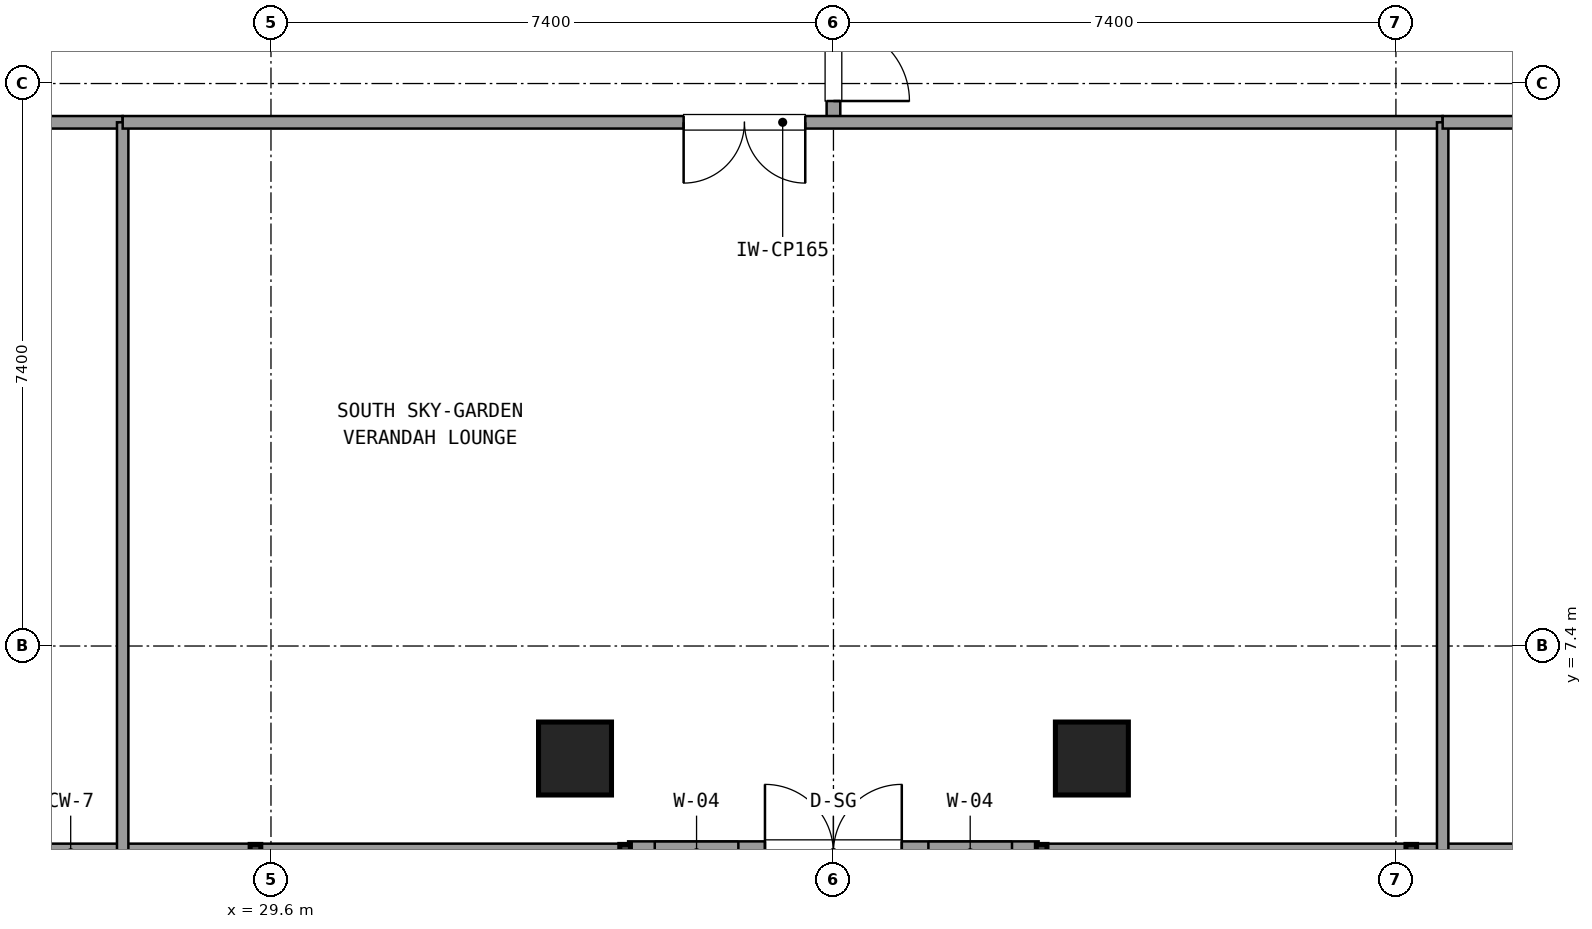
"""IFC4 building model, lengths in metres.
Left out: names, types, materials, properties, quantities, classifications, styles, units other than length and angle.
Written with IfcOpenShell. Run it as: python <this file> out.ifc"""

import sys

from ifc_helpers import new_model, si_unit, direction, frame, frame_2d, origin, origin_2d, place, context, subcontext, project, spatial, rectangle, extrude, element, fill, save


model = new_model("IFC4")
c1 = context("Model", 3, precision=1e-05, world=origin(), true_north=direction((0.0, 1.0)))
c2 = subcontext(c1, "Body", "Model", "MODEL_VIEW")
j1 = project(units=[si_unit("LENGTHUNIT", "METRE"), si_unit("PLANEANGLEUNIT", "RADIAN")], contexts=[c1])
p1 = place(None, origin())
s1 = spatial("IfcSite", under=j1, at=p1, CompositionType="ELEMENT")
p2 = place(p1, origin())
s2 = spatial("IfcBuilding", under=s1, at=p2, CompositionType="ELEMENT")
p3 = place(p2, frame((0.0, 0.0, 129.06)))
s3 = spatial("IfcBuildingStorey", under=s2, at=p3, CompositionType="ELEMENT", Elevation=129.06)
for number, where, z_axis, x_axis in (
    (1, (33.6, 5.92, 0.021), (0.0, 0.0, 1.0), (1.0, 0.0, 0.0)),
    (2, (40.4, 5.92, 0.021), (0.0, 0.0, 1.0), (1.0, 0.0, 0.0)),
):
    element("IfcColumn", number, at=place(p3, frame(where, z_axis=z_axis, x_axis=x_axis)), inside=s3, PredefinedType="COLUMN", context=c2, shape_type="SweptSolid", body=[
        extrude(rectangle(XDim=0.96, YDim=0.96, at=origin_2d()), origin(), (0.0, 0.0, 1.0), 5.739),
    ])
p4 = place(p3, frame((34.299, 4.68, 0.0), z_axis=(0.0, 0.0, 1.0), x_axis=(1.0, 0.0, 0.0)))
e3 = element("IfcWall", 3, at=p4, inside=s3, PredefinedType="SOLIDWALL", context=c2, shape_type="SweptSolid", body=[
    extrude(rectangle(XDim=5.4, YDim=0.3, at=frame_2d((2.7, 0.0))), origin(), (0.0, 0.0, 1.0), 4.83),
])
p5 = place(p4, frame((1.8, 0.0, 0.0)))
e4 = element("IfcOpeningElement", 4, at=p5, cuts=e3, PredefinedType="OPENING", context=c2, shape_type="SweptSolid", body=[
    extrude(rectangle(XDim=1.8, YDim=2.25, at=frame_2d((0.9, 1.125))), frame((0.0, 0.16, 0.0), z_axis=(0.0, -1.0, 0.0), x_axis=(1.0, 0.0, 0.0)), (0.0, 0.0, 1.0), 0.32),
])
p6 = place(p4, frame((0.35, 0.0, 0.4)))
e5 = element("IfcOpeningElement", 5, at=p6, cuts=e3, PredefinedType="OPENING", context=c2, shape_type="SweptSolid", body=[
    extrude(rectangle(XDim=1.1, YDim=1.8, at=frame_2d((0.55, 0.9))), frame((0.0, 0.16, 0.0), z_axis=(0.0, -1.0, 0.0), x_axis=(1.0, 0.0, 0.0)), (0.0, 0.0, 1.0), 0.32),
])
p7 = place(p4, frame((3.95, 0.0, 0.4)))
e6 = element("IfcOpeningElement", 6, at=p7, cuts=e3, PredefinedType="OPENING", context=c2, shape_type="SweptSolid", body=[
    extrude(rectangle(XDim=1.1, YDim=1.8, at=frame_2d((0.55, 0.9))), frame((0.0, 0.16, 0.0), z_axis=(0.0, -1.0, 0.0), x_axis=(1.0, 0.0, 0.0)), (0.0, 0.0, 1.0), 0.32),
])
p8 = place(p3, frame((19.671, 4.68, 0.0), z_axis=(0.0, 0.0, 1.0), x_axis=(1.0, 0.0, 0.0)))
e7 = element("IfcWall", 7, at=p8, inside=s3, PredefinedType="SOLIDWALL", context=c2, shape_type="SweptSolid", body=[
    extrude(rectangle(XDim=14.588, YDim=0.24, at=frame_2d((7.294, 0.0))), origin(), (0.0, 0.0, 1.0), 0.85),
])
p9 = place(p3, frame((39.739, 4.68, 0.0), z_axis=(0.0, 0.0, 1.0), x_axis=(1.0, 0.0, 0.0)))
e8 = element("IfcWall", 8, at=p9, inside=s3, PredefinedType="SOLIDWALL", context=c2, shape_type="SweptSolid", body=[
    extrude(rectangle(XDim=14.59, YDim=0.24, at=frame_2d((7.295, 0.0))), origin(), (0.0, 0.0, 1.0), 0.85),
])
p10 = place(p3, frame((37.0, 14.29, 0.0), z_axis=(0.0, 0.0, 1.0), x_axis=(0.0, 1.0, 0.0)))
e9 = element("IfcWall", 9, at=p10, inside=s3, PredefinedType="PARTITIONING", context=c2, shape_type="SweptSolid", body=[
    extrude(rectangle(XDim=2.56, YDim=0.18, at=frame_2d((1.28, 0.0))), origin(), (0.0, 0.0, 1.0), 4.77),
])
p11 = place(p10, frame((0.28, 0.0, 0.0)))
e10 = element("IfcOpeningElement", 10, at=p11, cuts=e9, PredefinedType="OPENING", context=c2, shape_type="SweptSolid", body=[
    extrude(rectangle(XDim=2.0, YDim=2.2, at=frame_2d((1.0, 1.1))), frame((0.0, 0.1, 0.0), z_axis=(0.0, -1.0, 0.0), x_axis=(1.0, 0.0, 0.0)), (0.0, 0.0, 1.0), 0.2),
])
p12 = place(p3, frame((22.79, 14.29, 0.0), z_axis=(0.0, 0.0, 1.0), x_axis=(1.0, 0.0, 0.0)))
e11 = element("IfcWall", 11, at=p12, inside=s3, PredefinedType="PARTITIONING", context=c2, shape_type="SweptSolid", body=[
    extrude(rectangle(XDim=4.859, YDim=0.165, at=frame_2d((2.429, 0.0))), origin(), (0.0, 0.0, 1.0), 4.77),
])
p13 = place(p12, frame((1.63, 0.0, 0.0)))
e12 = element("IfcOpeningElement", 12, at=p13, cuts=e11, PredefinedType="OPENING", context=c2, shape_type="SweptSolid", body=[
    extrude(rectangle(XDim=1.6, YDim=2.2, at=frame_2d((0.8, 1.1))), frame((0.0, 0.093, 0.0), z_axis=(0.0, -1.0, 0.0), x_axis=(1.0, 0.0, 0.0)), (0.0, 0.0, 1.0), 0.185),
])
p14 = place(p3, frame((27.649, 14.29, 0.0), z_axis=(0.0, 0.0, 1.0), x_axis=(0.0, -1.0, 0.0)))
e13 = element("IfcWall", 13, at=p14, inside=s3, PredefinedType="PARTITIONING", context=c2, shape_type="SweptSolid", body=[
    extrude(rectangle(XDim=9.59, YDim=0.15, at=frame_2d((4.795, 0.0))), origin(), (0.0, 0.0, 1.0), 4.77),
])
p15 = place(p3, frame((27.649, 14.29, 0.0), z_axis=(0.0, 0.0, 1.0), x_axis=(1.0, 0.0, 0.0)))
e14 = element("IfcWall", 14, at=p15, inside=s3, PredefinedType="PARTITIONING", context=c2, shape_type="SweptSolid", body=[
    extrude(rectangle(XDim=17.366, YDim=0.165, at=frame_2d((8.683, 0.0))), origin(), (0.0, 0.0, 1.0), 4.77),
])
p16 = place(p15, frame((7.38, 0.0, 0.0)))
e15 = element("IfcOpeningElement", 15, at=p16, cuts=e14, PredefinedType="OPENING", context=c2, shape_type="SweptSolid", body=[
    extrude(rectangle(XDim=1.6, YDim=2.2, at=frame_2d((0.8, 1.1))), frame((0.0, 0.093, 0.0), z_axis=(0.0, -1.0, 0.0), x_axis=(1.0, 0.0, 0.0)), (0.0, 0.0, 1.0), 0.185),
])
p17 = place(p3, frame((45.015, 14.29, 0.0), z_axis=(0.0, 0.0, 1.0), x_axis=(0.0, -1.0, 0.0)))
e16 = element("IfcWall", 16, at=p17, inside=s3, PredefinedType="PARTITIONING", context=c2, shape_type="SweptSolid", body=[
    extrude(rectangle(XDim=9.59, YDim=0.15, at=frame_2d((4.795, 0.0))), origin(), (0.0, 0.0, 1.0), 4.77),
])
p18 = place(p3, frame((45.015, 14.29, 0.0), z_axis=(0.0, 0.0, 1.0), x_axis=(1.0, 0.0, 0.0)))
e17 = element("IfcWall", 17, at=p18, inside=s3, PredefinedType="PARTITIONING", context=c2, shape_type="SweptSolid", body=[
    extrude(rectangle(XDim=6.195, YDim=0.165, at=frame_2d((3.098, 0.0))), origin(), (0.0, 0.0, 1.0), 4.77),
])
p19 = place(p18, frame((2.298, 0.0, 0.0)))
e18 = element("IfcOpeningElement", 18, at=p19, cuts=e17, PredefinedType="OPENING", context=c2, shape_type="SweptSolid", body=[
    extrude(rectangle(XDim=1.6, YDim=2.2, at=frame_2d((0.8, 1.1))), frame((0.0, 0.093, 0.0), z_axis=(0.0, -1.0, 0.0), x_axis=(1.0, 0.0, 0.0)), (0.0, 0.0, 1.0), 0.185),
])
p20 = place(p11, frame((2.0, 0.0, 0.0), z_axis=(0.0, 0.0, 1.0), x_axis=(-1.0, 0.0, 0.0)))
e19 = element("IfcDoor", 19, at=p20, inside=s3, OperationType="DOUBLE_DOOR_SINGLE_SWING", PredefinedType="DOOR", context=c2, shape_type="SweptSolid", body=[
    extrude(rectangle(XDim=2.0, YDim=2.2, at=frame_2d((1.0, 1.1))), frame((0.0, 0.025, 0.0), z_axis=(0.0, -1.0, 0.0), x_axis=(1.0, 0.0, 0.0)), (0.0, 0.0, 1.0), 0.05),
])
fill(e10, e19)
p21 = place(p16, frame((1.6, 0.0, 0.0), z_axis=(0.0, 0.0, 1.0), x_axis=(-1.0, 0.0, 0.0)))
e20 = element("IfcDoor", 20, at=p21, inside=s3, OperationType="DOUBLE_DOOR_SINGLE_SWING", PredefinedType="DOOR", context=c2, shape_type="SweptSolid", body=[
    extrude(rectangle(XDim=1.6, YDim=2.2, at=frame_2d((0.8, 1.1))), frame((0.0, 0.025, 0.0), z_axis=(0.0, -1.0, 0.0), x_axis=(1.0, 0.0, 0.0)), (0.0, 0.0, 1.0), 0.05),
])
fill(e15, e20)
save(model, sys.argv[1])
